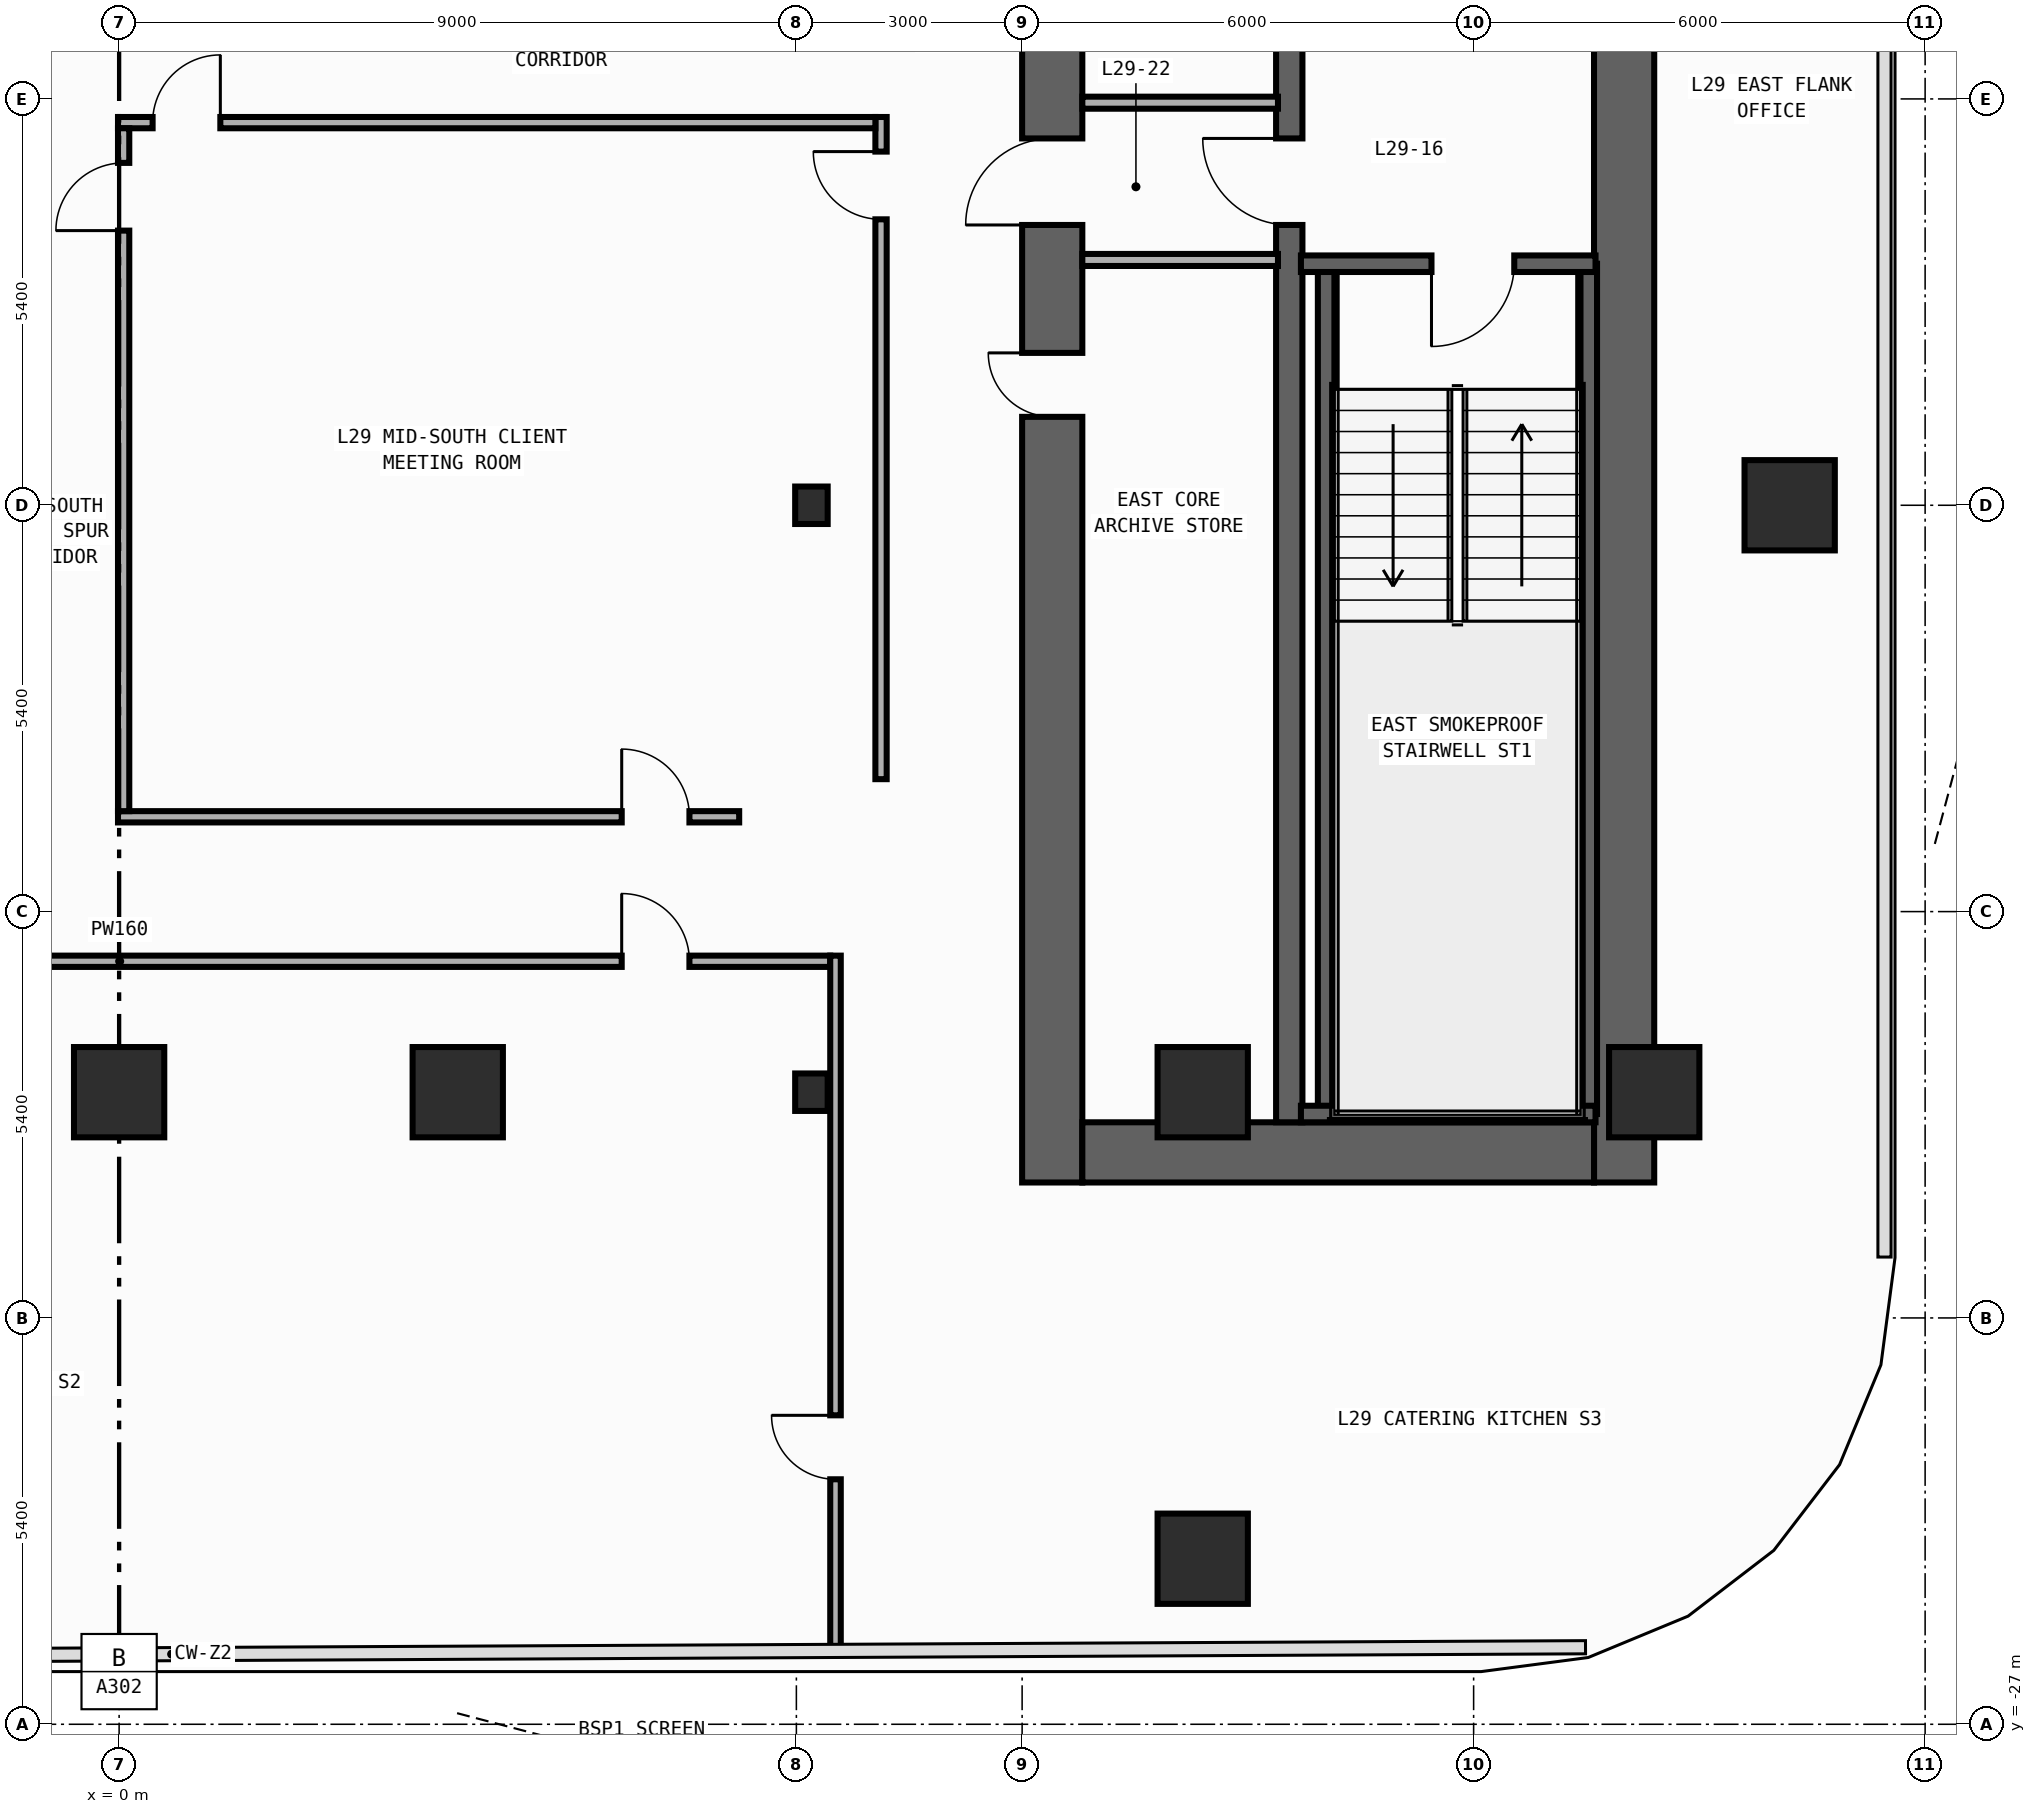
"""IFC4 building model, lengths in metres.
Left out: names, types, materials, properties, quantities, classifications, styles, units other than length and angle.
Written with IfcOpenShell. Run it as: python <this file> out.ifc"""

import sys

from ifc_helpers import new_model, si_unit, direction, frame, frame_2d, origin, origin_2d, place, context, subcontext, project, spatial, rectangle, i_section, extrude, element, fill, save


model = new_model("IFC4")
c1 = context("Model", 3, precision=1e-05, world=origin(), true_north=direction((0.0, 1.0)))
c2 = subcontext(c1, "Body", "Model", "MODEL_VIEW")
j1 = project(units=[si_unit("LENGTHUNIT", "METRE"), si_unit("PLANEANGLEUNIT", "RADIAN")], contexts=[c1])
p1 = place(None, origin())
s1 = spatial("IfcSite", under=j1, at=p1, CompositionType="ELEMENT")
p2 = place(p1, origin())
s2 = spatial("IfcBuilding", under=s1, at=p2, CompositionType="ELEMENT")
p3 = place(p2, frame((0.0, 0.0, 126.8)))
s3 = spatial("IfcBuildingStorey", under=s2, at=p3, CompositionType="ELEMENT", Elevation=126.8)
p4 = place(p3, frame((12.4, -19.8, 0.0), z_axis=(0.0, 0.0, 1.0), x_axis=(0.0, 1.0, 0.0)))
e1 = element("IfcWall", 1, at=p4, inside=s3, PredefinedType="SHEAR", context=c2, shape_type="SweptSolid", body=[
    extrude(rectangle(XDim=27.0, YDim=0.8, at=frame_2d((13.5, 0.0))), origin(), (0.0, 0.0, 1.0), 3.94),
])
p5 = place(p4, frame((23.05, 0.0, 0.0)))
e2 = element("IfcOpeningElement", 2, at=p5, cuts=e1, PredefinedType="OPENING", context=c2, shape_type="SweptSolid", body=[
    extrude(rectangle(XDim=1.1, YDim=2.2, at=frame_2d((0.55, 1.1))), frame((0.0, 0.41, 0.0), z_axis=(0.0, -1.0, 0.0), x_axis=(1.0, 0.0, 0.0)), (0.0, 0.0, 1.0), 0.82),
])
p6 = place(p4, frame((19.85, 0.0, 0.0)))
e3 = element("IfcOpeningElement", 3, at=p6, cuts=e1, PredefinedType="OPENING", context=c2, shape_type="SweptSolid", body=[
    extrude(rectangle(XDim=1.1, YDim=2.2, at=frame_2d((0.55, 1.1))), frame((0.0, 0.41, 0.0), z_axis=(0.0, -1.0, 0.0), x_axis=(1.0, 0.0, 0.0)), (0.0, 0.0, 1.0), 0.82),
])
p7 = place(p4, frame((16.65, 0.0, 0.0)))
e4 = element("IfcOpeningElement", 4, at=p7, cuts=e1, PredefinedType="OPENING", context=c2, shape_type="SweptSolid", body=[
    extrude(rectangle(XDim=1.1, YDim=2.2, at=frame_2d((0.55, 1.1))), frame((0.0, 0.41, 0.0), z_axis=(0.0, -1.0, 0.0), x_axis=(1.0, 0.0, 0.0)), (0.0, 0.0, 1.0), 0.82),
])
p8 = place(p4, frame((10.175, 0.0, 0.0)))
e5 = element("IfcOpeningElement", 5, at=p8, cuts=e1, PredefinedType="OPENING", context=c2, shape_type="SweptSolid", body=[
    extrude(rectangle(XDim=0.85, YDim=2.1, at=frame_2d((0.425, 1.05))), frame((0.0, 0.41, 0.0), z_axis=(0.0, -1.0, 0.0), x_axis=(1.0, 0.0, 0.0)), (0.0, 0.0, 1.0), 0.82),
])
p9 = place(p4, frame((12.725, 0.0, 0.0)))
e6 = element("IfcOpeningElement", 6, at=p9, cuts=e1, PredefinedType="OPENING", context=c2, shape_type="SweptSolid", body=[
    extrude(rectangle(XDim=1.15, YDim=2.2, at=frame_2d((0.575, 1.1))), frame((0.0, 0.41, 0.0), z_axis=(0.0, -1.0, 0.0), x_axis=(1.0, 0.0, 0.0)), (0.0, 0.0, 1.0), 0.82),
])
p10 = place(p4, frame((25.125, 0.0, 0.0)))
e7 = element("IfcOpeningElement", 7, at=p10, cuts=e1, PredefinedType="OPENING", context=c2, shape_type="SweptSolid", body=[
    extrude(rectangle(XDim=0.85, YDim=2.1, at=frame_2d((0.425, 1.05))), frame((0.0, 0.41, 0.0), z_axis=(0.0, -1.0, 0.0), x_axis=(1.0, 0.0, 0.0)), (0.0, 0.0, 1.0), 0.82),
])
p11 = place(p3, frame((20.0, -19.8, 0.0), z_axis=(0.0, 0.0, 1.0), x_axis=(0.0, 1.0, 0.0)))
e8 = element("IfcWall", 8, at=p11, inside=s3, PredefinedType="SHEAR", context=c2, shape_type="SweptSolid", body=[
    extrude(rectangle(XDim=27.0, YDim=0.8, at=frame_2d((13.5, 0.0))), origin(), (0.0, 0.0, 1.0), 3.94),
])
p12 = place(p3, frame((12.8, -19.4, 0.0), z_axis=(0.0, 0.0, 1.0), x_axis=(1.0, 0.0, 0.0)))
e9 = element("IfcWall", 9, at=p12, inside=s3, PredefinedType="SHEAR", context=c2, shape_type="SweptSolid", body=[
    extrude(rectangle(XDim=6.8, YDim=0.8, at=frame_2d((3.4, 0.0))), origin(), (0.0, 0.0, 1.0), 3.94),
])
p13 = place(p3, frame((15.55, -19.0, 0.0), z_axis=(0.0, 0.0, 1.0), x_axis=(0.0, 1.0, 0.0)))
e10 = element("IfcWall", 10, at=p13, inside=s3, PredefinedType="SHEAR", context=c2, shape_type="SweptSolid", body=[
    extrude(rectangle(XDim=25.4, YDim=0.35, at=frame_2d((12.7, 0.0))), origin(), (0.0, 0.0, 1.0), 3.94),
])
p14 = place(p13, frame((11.925, 0.0, 0.0)))
e11 = element("IfcOpeningElement", 11, at=p14, cuts=e10, PredefinedType="OPENING", context=c2, shape_type="SweptSolid", body=[
    extrude(rectangle(XDim=1.15, YDim=2.2, at=frame_2d((0.575, 1.1))), frame((0.0, 0.185, 0.0), z_axis=(0.0, -1.0, 0.0), x_axis=(1.0, 0.0, 0.0)), (0.0, 0.0, 1.0), 0.37),
])
p15 = place(p13, frame((24.325, 0.0, 0.0)))
e12 = element("IfcOpeningElement", 12, at=p15, cuts=e10, PredefinedType="OPENING", context=c2, shape_type="SweptSolid", body=[
    extrude(rectangle(XDim=0.85, YDim=2.1, at=frame_2d((0.425, 1.05))), frame((0.0, 0.185, 0.0), z_axis=(0.0, -1.0, 0.0), x_axis=(1.0, 0.0, 0.0)), (0.0, 0.0, 1.0), 0.37),
])
for number, where, z_axis, x_axis in (
    (13, (16.04, -18.89, 0.0), (0.0, 0.0, 1.0), (0.0, 1.0, 0.0)),
    (14, (19.53, -18.89, 0.0), (0.0, 0.0, 1.0), (0.0, 1.0, 0.0)),
):
    element("IfcWall", number, at=place(p3, frame(where, z_axis=z_axis, x_axis=x_axis)), inside=s3, PredefinedType="SHEAR", context=c2, shape_type="SweptSolid", body=[
        extrude(rectangle(XDim=11.3, YDim=0.22, at=frame_2d((5.65, 0.0))), origin(), (0.0, 0.0, 1.0), 3.94),
    ])
p16 = place(p3, frame((15.705, -18.89, 0.0), z_axis=(0.0, 0.0, 1.0), x_axis=(1.0, 0.0, 0.0)))
e15 = element("IfcWall", 15, at=p16, inside=s3, PredefinedType="SHEAR", context=c2, shape_type="SweptSolid", body=[
    extrude(rectangle(XDim=3.915, YDim=0.22, at=frame_2d((1.958, 0.0))), origin(), (0.0, 0.0, 1.0), 3.94),
])
p17 = place(p3, frame((19.62, -7.59, 0.0), z_axis=(0.0, 0.0, 1.0), x_axis=(-1.0, 0.0, 0.0)))
e16 = element("IfcWall", 16, at=p17, inside=s3, PredefinedType="SHEAR", context=c2, shape_type="SweptSolid", body=[
    extrude(rectangle(XDim=3.915, YDim=0.22, at=frame_2d((1.958, 0.0))), origin(), (0.0, 0.0, 1.0), 3.94),
])
p18 = place(p17, frame((1.08, 0.0, 0.0)))
e17 = element("IfcOpeningElement", 17, at=p18, cuts=e16, PredefinedType="OPENING", context=c2, shape_type="SweptSolid", body=[
    extrude(rectangle(XDim=1.1, YDim=2.2, at=frame_2d((0.55, 1.1))), frame((0.0, 0.12, 0.0), z_axis=(0.0, -1.0, 0.0), x_axis=(1.0, 0.0, 0.0)), (0.0, 0.0, 1.0), 0.24),
])
for number, where, z_axis, x_axis in (
    (18, (9.2, -18.6, 0.0), (0.0, 0.0, 1.0), (1.0, 0.0, 0.0)),
    (19, (9.2, -10.8, 0.0), (0.0, 0.0, 1.0), (1.0, 0.0, 0.0)),
):
    element("IfcColumn", number, at=place(p3, frame(where, z_axis=z_axis, x_axis=x_axis)), inside=s3, PredefinedType="COLUMN", context=c2, shape_type="SweptSolid", body=[
        extrude(i_section(OverallWidth=0.432, OverallDepth=0.498, WebThickness=0.045, FlangeThickness=0.07, FilletRadius=0.022, at=origin_2d()), origin(), (0.0, 0.0, 1.0), 4.2),
    ])
for number, where, z_axis, x_axis in (
    (20, (20.4, -18.6, 0.0), (0.0, 0.0, 1.0), (1.0, 0.0, 0.0)),
    (21, (14.4, -18.6, 0.0), (0.0, 0.0, 1.0), (1.0, 0.0, 0.0)),
    (22, (0.0, -18.6, 0.0), (0.0, 0.0, 1.0), (1.0, 0.0, 0.0)),
    (23, (4.5, -18.6, 0.0), (0.0, 0.0, 1.0), (1.0, 0.0, 0.0)),
    (24, (22.2, -10.8, 0.0), (0.0, 0.0, 1.0), (1.0, 0.0, 0.0)),
    (25, (14.4, -24.8, 0.0), (0.0, 0.0, 1.0), (1.0, 0.0, 0.0)),
):
    element("IfcColumn", number, at=place(p3, frame(where, z_axis=z_axis, x_axis=x_axis)), inside=s3, PredefinedType="COLUMN", context=c2, shape_type="SweptSolid", body=[
        extrude(rectangle(XDim=1.2, YDim=1.2, at=origin_2d()), origin(), (0.0, 0.0, 1.0), 4.2),
    ])
for number, where, z_axis, x_axis in (
    (26, (12.8, -5.45, 0.0), (0.0, 0.0, 1.0), (1.0, 0.0, 0.0)),
    (27, (12.8, -7.54, 0.0), (0.0, 0.0, 1.0), (1.0, 0.0, 0.0)),
):
    element("IfcWall", number, at=place(p3, frame(where, z_axis=z_axis, x_axis=x_axis)), inside=s3, PredefinedType="STANDARD", context=c2, shape_type="SweptSolid", body=[
        extrude(rectangle(XDim=2.6, YDim=0.16, at=frame_2d((1.3, 0.0))), origin(), (0.0, 0.0, 1.0), 3.94),
    ])
p19 = place(p3, frame((10.125, -14.44, 0.0), z_axis=(0.0, 0.0, 1.0), x_axis=(0.0, 1.0, 0.0)))
e28 = element("IfcWall", 28, at=p19, inside=s3, PredefinedType="PARTITIONING", context=c2, shape_type="SweptSolid", body=[
    extrude(rectangle(XDim=8.8, YDim=0.15, at=frame_2d((4.4, 0.0))), origin(), (0.0, 0.0, 1.0), 3.94),
])
p20 = place(p19, frame((7.44, 0.0, 0.0)))
e29 = element("IfcOpeningElement", 29, at=p20, cuts=e28, PredefinedType="OPENING", context=c2, shape_type="SweptSolid", body=[
    extrude(rectangle(XDim=0.9, YDim=2.15, at=frame_2d((0.45, 1.075))), frame((0.0, 0.085, 0.0), z_axis=(0.0, -1.0, 0.0), x_axis=(1.0, 0.0, 0.0)), (0.0, 0.0, 1.0), 0.17),
])
p21 = place(p3, frame((-0.015, -5.715, 0.0), z_axis=(0.0, 0.0, 1.0), x_axis=(1.0, 0.0, 0.0)))
e30 = element("IfcWall", 30, at=p21, inside=s3, PredefinedType="PARTITIONING", context=c2, shape_type="SweptSolid", body=[
    extrude(rectangle(XDim=10.065, YDim=0.15, at=frame_2d((5.032, 0.0))), origin(), (0.0, 0.0, 1.0), 3.94),
])
p22 = place(p21, frame((0.46, 0.0, 0.0)))
e31 = element("IfcOpeningElement", 31, at=p22, cuts=e30, PredefinedType="OPENING", context=c2, shape_type="SweptSolid", body=[
    extrude(rectangle(XDim=0.9, YDim=2.15, at=frame_2d((0.45, 1.075))), frame((0.0, 0.085, 0.0), z_axis=(0.0, -1.0, 0.0), x_axis=(1.0, 0.0, 0.0)), (0.0, 0.0, 1.0), 0.17),
])
p23 = place(p3, frame((-6.664, -16.86, 0.0), z_axis=(0.0, 0.0, 1.0), x_axis=(1.0, 0.0, 0.0)))
e32 = element("IfcWall", 32, at=p23, inside=s3, PredefinedType="PARTITIONING", context=c2, shape_type="SweptSolid", body=[
    extrude(rectangle(XDim=16.114, YDim=0.15, at=frame_2d((8.057, 0.0))), origin(), (0.0, 0.0, 1.0), 3.94),
])
p24 = place(p23, frame((13.343, 0.0, 0.0)))
e33 = element("IfcOpeningElement", 33, at=p24, cuts=e32, PredefinedType="OPENING", context=c2, shape_type="SweptSolid", body=[
    extrude(rectangle(XDim=0.9, YDim=2.15, at=frame_2d((0.45, 1.075))), frame((0.0, 0.085, 0.0), z_axis=(0.0, -1.0, 0.0), x_axis=(1.0, 0.0, 0.0)), (0.0, 0.0, 1.0), 0.17),
])
p25 = place(p3, frame((-0.015, -14.94, 0.0), z_axis=(0.0, 0.0, 1.0), x_axis=(1.0, 0.0, 0.0)))
e34 = element("IfcWall", 34, at=p25, inside=s3, PredefinedType="PARTITIONING", context=c2, shape_type="SweptSolid", body=[
    extrude(rectangle(XDim=8.255, YDim=0.15, at=frame_2d((4.127, 0.0))), origin(), (0.0, 0.0, 1.0), 3.94),
])
p26 = place(p25, frame((6.694, 0.0, 0.0)))
e35 = element("IfcOpeningElement", 35, at=p26, cuts=e34, PredefinedType="OPENING", context=c2, shape_type="SweptSolid", body=[
    extrude(rectangle(XDim=0.9, YDim=2.15, at=frame_2d((0.45, 1.075))), frame((0.0, 0.085, 0.0), z_axis=(0.0, -1.0, 0.0), x_axis=(1.0, 0.0, 0.0)), (0.0, 0.0, 1.0), 0.17),
])
p27 = place(p3, frame((0.06, -14.865, 0.0), z_axis=(0.0, 0.0, 1.0), x_axis=(0.0, 1.0, 0.0)))
e36 = element("IfcWall", 36, at=p27, inside=s3, PredefinedType="PARTITIONING", context=c2, shape_type="SweptSolid", body=[
    extrude(rectangle(XDim=9.075, YDim=0.15, at=frame_2d((4.538, 0.0))), origin(), (0.0, 0.0, 1.0), 3.94),
])
p28 = place(p27, frame((7.715, 0.0, 0.0)))
e37 = element("IfcOpeningElement", 37, at=p28, cuts=e36, PredefinedType="OPENING", context=c2, shape_type="SweptSolid", body=[
    extrude(rectangle(XDim=0.9, YDim=2.15, at=frame_2d((0.45, 1.075))), frame((0.0, 0.085, 0.0), z_axis=(0.0, -1.0, 0.0), x_axis=(1.0, 0.0, 0.0)), (0.0, 0.0, 1.0), 0.17),
])
p29 = place(p3, frame((9.52, -26.02, 0.0), z_axis=(0.0, 0.0, 1.0), x_axis=(0.0, 1.0, 0.0)))
e38 = element("IfcWall", 38, at=p29, inside=s3, PredefinedType="PARTITIONING", context=c2, shape_type="SweptSolid", body=[
    extrude(rectangle(XDim=9.235, YDim=0.14, at=frame_2d((4.618, 0.0))), origin(), (0.0, 0.0, 1.0), 3.24),
])
p30 = place(p29, frame((2.276, 0.0, 0.0)))
e39 = element("IfcOpeningElement", 39, at=p30, cuts=e38, PredefinedType="OPENING", context=c2, shape_type="SweptSolid", body=[
    extrude(rectangle(XDim=0.85, YDim=2.1, at=frame_2d((0.425, 1.05))), frame((0.0, 0.08, 0.0), z_axis=(0.0, -1.0, 0.0), x_axis=(1.0, 0.0, 0.0)), (0.0, 0.0, 1.0), 0.16),
])
p31 = place(p18, origin())
e40 = element("IfcDoor", 40, at=p31, inside=s3, OperationType="SINGLE_SWING_RIGHT", PredefinedType="DOOR", context=c2, shape_type="SweptSolid", body=[
    extrude(rectangle(XDim=1.1, YDim=2.2, at=frame_2d((0.55, 1.1))), frame((0.0, 0.025, 0.0), z_axis=(0.0, -1.0, 0.0), x_axis=(1.0, 0.0, 0.0)), (0.0, 0.0, 1.0), 0.05),
])
fill(e17, e40)
p32 = place(p8, origin())
e41 = element("IfcDoor", 41, at=p32, inside=s3, OperationType="SINGLE_SWING_RIGHT", PredefinedType="DOOR", context=c2, shape_type="SweptSolid", body=[
    extrude(rectangle(XDim=0.85, YDim=2.1, at=frame_2d((0.425, 1.05))), frame((0.0, 0.025, 0.0), z_axis=(0.0, -1.0, 0.0), x_axis=(1.0, 0.0, 0.0)), (0.0, 0.0, 1.0), 0.05),
])
fill(e5, e41)
p33 = place(p9, origin())
e42 = element("IfcDoor", 42, at=p33, inside=s3, OperationType="SINGLE_SWING_LEFT", PredefinedType="DOOR", context=c2, shape_type="SweptSolid", body=[
    extrude(rectangle(XDim=1.15, YDim=2.2, at=frame_2d((0.575, 1.1))), frame((0.0, 0.025, 0.0), z_axis=(0.0, -1.0, 0.0), x_axis=(1.0, 0.0, 0.0)), (0.0, 0.0, 1.0), 0.05),
])
fill(e6, e42)
p34 = place(p14, origin())
e43 = element("IfcDoor", 43, at=p34, inside=s3, OperationType="SINGLE_SWING_RIGHT", PredefinedType="DOOR", context=c2, shape_type="SweptSolid", body=[
    extrude(rectangle(XDim=1.15, YDim=2.2, at=frame_2d((0.575, 1.1))), frame((0.0, 0.025, 0.0), z_axis=(0.0, -1.0, 0.0), x_axis=(1.0, 0.0, 0.0)), (0.0, 0.0, 1.0), 0.05),
])
fill(e11, e43)
p35 = place(p20, origin())
e44 = element("IfcDoor", 44, at=p35, inside=s3, OperationType="SINGLE_SWING_RIGHT", PredefinedType="DOOR", context=c2, shape_type="SweptSolid", body=[
    extrude(rectangle(XDim=0.9, YDim=2.15, at=frame_2d((0.45, 1.075))), frame((0.0, 0.025, 0.0), z_axis=(0.0, -1.0, 0.0), x_axis=(1.0, 0.0, 0.0)), (0.0, 0.0, 1.0), 0.05),
])
fill(e29, e44)
p36 = place(p22, origin())
e45 = element("IfcDoor", 45, at=p36, inside=s3, OperationType="SINGLE_SWING_RIGHT", PredefinedType="DOOR", context=c2, shape_type="SweptSolid", body=[
    extrude(rectangle(XDim=0.9, YDim=2.15, at=frame_2d((0.45, 1.075))), frame((0.0, 0.025, 0.0), z_axis=(0.0, -1.0, 0.0), x_axis=(1.0, 0.0, 0.0)), (0.0, 0.0, 1.0), 0.05),
])
fill(e31, e45)
p37 = place(p24, origin())
e46 = element("IfcDoor", 46, at=p37, inside=s3, OperationType="SINGLE_SWING_LEFT", PredefinedType="DOOR", context=c2, shape_type="SweptSolid", body=[
    extrude(rectangle(XDim=0.9, YDim=2.15, at=frame_2d((0.45, 1.075))), frame((0.0, 0.025, 0.0), z_axis=(0.0, -1.0, 0.0), x_axis=(1.0, 0.0, 0.0)), (0.0, 0.0, 1.0), 0.05),
])
fill(e33, e46)
p38 = place(p26, origin())
e47 = element("IfcDoor", 47, at=p38, inside=s3, OperationType="SINGLE_SWING_LEFT", PredefinedType="DOOR", context=c2, shape_type="SweptSolid", body=[
    extrude(rectangle(XDim=0.9, YDim=2.15, at=frame_2d((0.45, 1.075))), frame((0.0, 0.025, 0.0), z_axis=(0.0, -1.0, 0.0), x_axis=(1.0, 0.0, 0.0)), (0.0, 0.0, 1.0), 0.05),
])
fill(e35, e47)
p39 = place(p28, origin())
e48 = element("IfcDoor", 48, at=p39, inside=s3, OperationType="SINGLE_SWING_LEFT", PredefinedType="DOOR", context=c2, shape_type="SweptSolid", body=[
    extrude(rectangle(XDim=0.9, YDim=2.15, at=frame_2d((0.45, 1.075))), frame((0.0, 0.025, 0.0), z_axis=(0.0, -1.0, 0.0), x_axis=(1.0, 0.0, 0.0)), (0.0, 0.0, 1.0), 0.05),
])
fill(e37, e48)
p40 = place(p30, origin())
e49 = element("IfcDoor", 49, at=p40, inside=s3, OperationType="SINGLE_SWING_RIGHT", PredefinedType="DOOR", context=c2, shape_type="SweptSolid", body=[
    extrude(rectangle(XDim=0.85, YDim=2.1, at=frame_2d((0.425, 1.05))), frame((0.0, 0.025, 0.0), z_axis=(0.0, -1.0, 0.0), x_axis=(1.0, 0.0, 0.0)), (0.0, 0.0, 1.0), 0.05),
])
fill(e39, e49)
save(model, sys.argv[1])
